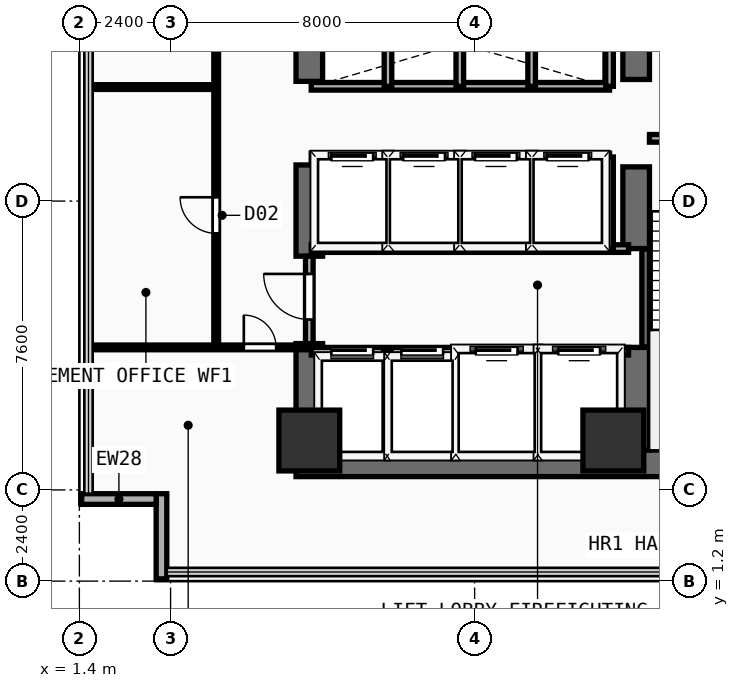
"""IFC4 building model, lengths in metres.
Left out: names, types, materials, properties, quantities, classifications, styles, units other than length and angle.
Written with IfcOpenShell. Run it as: python <this file> out.ifc"""

import sys

from ifc_helpers import new_model, si_unit, direction, frame, frame_2d, origin, origin_2d, place, context, subcontext, project, spatial, rectangle, extrude, element, fill, save


model = new_model("IFC4")
c1 = context("Model", 3, precision=1e-05, world=origin(), true_north=direction((0.0, 1.0)))
c2 = subcontext(c1, "Body", "Model", "MODEL_VIEW")
j1 = project(units=[si_unit("LENGTHUNIT", "METRE"), si_unit("PLANEANGLEUNIT", "RADIAN")], contexts=[c1])
p1 = place(None, origin())
s1 = spatial("IfcSite", under=j1, at=p1, CompositionType="ELEMENT")
p2 = place(p1, origin())
s2 = spatial("IfcBuilding", under=s1, at=p2, CompositionType="ELEMENT")
p3 = place(p2, frame((0.0, 0.0, 63.8)))
s3 = spatial("IfcBuildingStorey", under=s2, at=p3, CompositionType="ELEMENT", Elevation=63.8)
p4 = place(p3, frame((7.1, 4.3, 0.0), z_axis=(0.0, 0.0, 1.0), x_axis=(1.0, 0.0, 0.0)))
e1 = element("IfcWall", 1, at=p4, inside=s3, PredefinedType="SHEAR", context=c2, shape_type="SweptSolid", body=[
    extrude(rectangle(XDim=14.05, YDim=0.7, at=frame_2d((7.025, 0.0))), origin(), (0.0, 0.0, 1.0), 3.54),
])
p5 = place(p3, frame((7.45, 4.65, 0.0), z_axis=(0.0, 0.0, 1.0), x_axis=(0.0, 1.0, 0.0)))
e2 = element("IfcWall", 2, at=p5, inside=s3, PredefinedType="SHEAR", context=c2, shape_type="SweptSolid", body=[
    extrude(rectangle(XDim=2.8, YDim=0.7, at=frame_2d((1.4, 0.0))), origin(), (0.0, 0.0, 1.0), 3.54),
])
p6 = place(p3, frame((7.45, 9.75, 0.0), z_axis=(0.0, 0.0, 1.0), x_axis=(0.0, 1.0, 0.0)))
e3 = element("IfcWall", 3, at=p6, inside=s3, PredefinedType="SHEAR", context=c2, shape_type="SweptSolid", body=[
    extrude(rectangle(XDim=2.4, YDim=0.7, at=frame_2d((1.2, 0.0))), origin(), (0.0, 0.0, 1.0), 3.54),
])
p7 = place(p3, frame((7.45, 14.35, 0.0), z_axis=(0.0, 0.0, 1.0), x_axis=(0.0, 1.0, 0.0)))
e4 = element("IfcWall", 4, at=p7, inside=s3, PredefinedType="SHEAR", context=c2, shape_type="SweptSolid", body=[
    extrude(rectangle(XDim=4.81, YDim=0.7, at=frame_2d((2.405, 0.0))), origin(), (0.0, 0.0, 1.0), 3.54),
])
p8 = place(p3, frame((16.05, 4.65, 0.0), z_axis=(0.0, 0.0, 1.0), x_axis=(0.0, 1.0, 0.0)))
e5 = element("IfcWall", 5, at=p8, inside=s3, PredefinedType="SHEAR", context=c2, shape_type="SweptSolid", body=[
    extrude(rectangle(XDim=2.7, YDim=0.7, at=frame_2d((1.35, 0.0))), origin(), (0.0, 0.0, 1.0), 3.54),
])
p9 = place(p3, frame((16.05, 9.95, 0.0), z_axis=(0.0, 0.0, 1.0), x_axis=(0.0, 1.0, 0.0)))
e6 = element("IfcWall", 6, at=p9, inside=s3, PredefinedType="SHEAR", context=c2, shape_type="SweptSolid", body=[
    extrude(rectangle(XDim=2.15, YDim=0.7, at=frame_2d((1.075, 0.0))), origin(), (0.0, 0.0, 1.0), 3.54),
])
p10 = place(p3, frame((16.05, 14.4, 0.0), z_axis=(0.0, 0.0, 1.0), x_axis=(0.0, 1.0, 0.0)))
e7 = element("IfcWall", 7, at=p10, inside=s3, PredefinedType="SHEAR", context=c2, shape_type="SweptSolid", body=[
    extrude(rectangle(XDim=9.1, YDim=0.7, at=frame_2d((4.55, 0.0))), origin(), (0.0, 0.0, 1.0), 3.54),
])
for number, where, z_axis, x_axis in (
    (8, (7.45, 4.9, 0.0), (0.0, 0.0, 1.0), (1.0, 0.0, 0.0)),
    (9, (15.45, 4.9, 0.0), (0.0, 0.0, 1.0), (1.0, 0.0, 0.0)),
):
    element("IfcColumn", number, at=place(p3, frame(where, z_axis=z_axis, x_axis=x_axis)), inside=s3, PredefinedType="COLUMN", context=c2, shape_type="SweptSolid", body=[
        extrude(rectangle(XDim=1.6, YDim=1.6, at=origin_2d()), origin(), (0.0, 0.0, 1.0), 3.54),
    ])
p11 = place(p3, frame((3.56, 1.26, 0.0), z_axis=(0.0, 0.0, 1.0), x_axis=(0.0, 1.0, 0.0)))
e10 = element("IfcWall", 10, at=p11, inside=s3, PredefinedType="SOLIDWALL", context=c2, shape_type="SweptSolid", body=[
    extrude(rectangle(XDim=2.24, YDim=0.28, at=frame_2d((1.12, 0.0))), origin(), (0.0, 0.0, 1.0), 3.54),
])
p12 = place(p3, frame((1.46, 3.36, 0.0), z_axis=(0.0, 0.0, 1.0), x_axis=(1.0, 0.0, 0.0)))
e11 = element("IfcWall", 11, at=p12, inside=s3, PredefinedType="SOLIDWALL", context=c2, shape_type="SweptSolid", body=[
    extrude(rectangle(XDim=1.96, YDim=0.28, at=frame_2d((0.98, 0.0))), origin(), (0.0, 0.0, 1.0), 3.54),
])
p13 = place(p3, frame((16.3, 7.36, 0.0), z_axis=(0.0, 0.0, 1.0), x_axis=(0.0, 1.0, 0.0)))
e12 = element("IfcWall", 12, at=p13, inside=s3, PredefinedType="SHEAR", context=c2, shape_type="SweptSolid", body=[
    extrude(rectangle(XDim=2.58, YDim=0.2, at=frame_2d((1.29, 0.0))), origin(), (0.0, 0.0, 1.0), 3.54),
])
p14 = place(p3, frame((16.4, 12.85, 0.0), z_axis=(0.0, 0.0, 1.0), x_axis=(1.0, 0.0, 0.0)))
e13 = element("IfcWall", 13, at=p14, inside=s3, PredefinedType="PARTITIONING", context=c2, shape_type="SweptSolid", body=[
    extrude(rectangle(XDim=3.96, YDim=0.2, at=frame_2d((1.98, 0.0))), origin(), (0.0, 0.0, 1.0), 3.54),
])
p15 = place(p14, frame((1.304, 0.0, 0.0)))
e14 = element("IfcOpeningElement", 14, at=p15, cuts=e13, PredefinedType="OPENING", context=c2, shape_type="SweptSolid", body=[
    extrude(rectangle(XDim=1.1, YDim=2.2, at=frame_2d((0.55, 1.1))), frame((0.0, 0.11, 0.0), z_axis=(0.0, -1.0, 0.0), x_axis=(1.0, 0.0, 0.0)), (0.0, 0.0, 1.0), 0.22),
])
p16 = place(p3, frame((7.5, 7.25, 0.0), z_axis=(0.0, 0.0, 1.0), x_axis=(1.0, 0.0, 0.0)))
e15 = element("IfcWall", 15, at=p16, inside=s3, PredefinedType="PARTITIONING", context=c2, shape_type="SweptSolid", body=[
    extrude(rectangle(XDim=8.35, YDim=0.2, at=frame_2d((4.175, 0.0))), origin(), (0.0, 0.0, 1.0), 3.54),
])
p17 = place(p16, frame((0.53, 0.0, 0.0)))
e16 = element("IfcOpeningElement", 16, at=p17, cuts=e15, PredefinedType="OPENING", context=c2, shape_type="SweptSolid", body=[
    extrude(rectangle(XDim=1.1, YDim=2.2, at=frame_2d((0.55, 1.1))), frame((0.0, 0.11, 0.0), z_axis=(0.0, -1.0, 0.0), x_axis=(1.0, 0.0, 0.0)), (0.0, 0.0, 1.0), 0.22),
])
p18 = place(p16, frame((2.37, 0.0, 0.0)))
e17 = element("IfcOpeningElement", 17, at=p18, cuts=e15, PredefinedType="OPENING", context=c2, shape_type="SweptSolid", body=[
    extrude(rectangle(XDim=1.1, YDim=2.2, at=frame_2d((0.55, 1.1))), frame((0.0, 0.11, 0.0), z_axis=(0.0, -1.0, 0.0), x_axis=(1.0, 0.0, 0.0)), (0.0, 0.0, 1.0), 0.22),
])
p19 = place(p16, frame((4.33, 0.0, 0.0)))
e18 = element("IfcOpeningElement", 18, at=p19, cuts=e15, PredefinedType="OPENING", context=c2, shape_type="SweptSolid", body=[
    extrude(rectangle(XDim=1.1, YDim=2.2, at=frame_2d((0.55, 1.1))), frame((0.0, 0.11, 0.0), z_axis=(0.0, -1.0, 0.0), x_axis=(1.0, 0.0, 0.0)), (0.0, 0.0, 1.0), 0.22),
])
p20 = place(p16, frame((6.5, 0.0, 0.0)))
e19 = element("IfcOpeningElement", 19, at=p20, cuts=e15, PredefinedType="OPENING", context=c2, shape_type="SweptSolid", body=[
    extrude(rectangle(XDim=1.1, YDim=2.2, at=frame_2d((0.55, 1.1))), frame((0.0, 0.11, 0.0), z_axis=(0.0, -1.0, 0.0), x_axis=(1.0, 0.0, 0.0)), (0.0, 0.0, 1.0), 0.22),
])
p21 = place(p3, frame((7.5, 9.95, 0.0), z_axis=(0.0, 0.0, 1.0), x_axis=(1.0, 0.0, 0.0)))
e20 = element("IfcWall", 20, at=p21, inside=s3, PredefinedType="PARTITIONING", context=c2, shape_type="SweptSolid", body=[
    extrude(rectangle(XDim=8.35, YDim=0.2, at=frame_2d((4.175, 0.0))), origin(), (0.0, 0.0, 1.0), 3.54),
])
for number, where, z_axis, x_axis in (
    (21, (9.5, 4.45, 0.0), (0.0, 0.0, 1.0), (0.0, 1.0, 0.0)),
    (22, (11.36, 4.45, 0.0), (0.0, 0.0, 1.0), (0.0, 1.0, 0.0)),
    (23, (13.46, 4.45, 0.0), (0.0, 0.0, 1.0), (0.0, 1.0, 0.0)),
):
    element("IfcWall", number, at=place(p3, frame(where, z_axis=z_axis, x_axis=x_axis)), inside=s3, PredefinedType="PARTITIONING", context=c2, shape_type="SweptSolid", body=[
        extrude(rectangle(XDim=2.8, YDim=0.2, at=frame_2d((1.4, 0.0))), origin(), (0.0, 0.0, 1.0), 3.54),
    ])
p22 = place(p3, frame((7.45, 7.45, 0.0), z_axis=(0.0, 0.0, 1.0), x_axis=(0.0, 1.0, 0.0)))
e24 = element("IfcWall", 24, at=p22, inside=s3, PredefinedType="PARTITIONING", context=c2, shape_type="SweptSolid", body=[
    extrude(rectangle(XDim=2.3, YDim=0.2, at=frame_2d((1.15, 0.0))), origin(), (0.0, 0.0, 1.0), 2.52),
])
p23 = place(p22, frame((0.633, 0.0, 0.0)))
e25 = element("IfcOpeningElement", 25, at=p23, cuts=e24, PredefinedType="OPENING", context=c2, shape_type="SweptSolid", body=[
    extrude(rectangle(XDim=1.2, YDim=2.25, at=frame_2d((0.6, 1.125))), frame((0.0, 0.11, 0.0), z_axis=(0.0, -1.0, 0.0), x_axis=(1.0, 0.0, 0.0)), (0.0, 0.0, 1.0), 0.22),
])
p24 = place(p3, frame((7.5, 12.36, 0.0), z_axis=(0.0, 0.0, 1.0), x_axis=(1.0, 0.0, 0.0)))
e26 = element("IfcWall", 26, at=p24, inside=s3, PredefinedType="PARTITIONING", context=c2, shape_type="SweptSolid", body=[
    extrude(rectangle(XDim=7.85, YDim=0.2, at=frame_2d((3.925, 0.0))), origin(), (0.0, 0.0, 1.0), 3.54),
])
p25 = place(p24, frame((0.53, 0.0, 0.0)))
e27 = element("IfcOpeningElement", 27, at=p25, cuts=e26, PredefinedType="OPENING", context=c2, shape_type="SweptSolid", body=[
    extrude(rectangle(XDim=1.1, YDim=2.2, at=frame_2d((0.55, 1.1))), frame((0.0, 0.11, 0.0), z_axis=(0.0, -1.0, 0.0), x_axis=(1.0, 0.0, 0.0)), (0.0, 0.0, 1.0), 0.22),
])
p26 = place(p24, frame((2.42, 0.0, 0.0)))
e28 = element("IfcOpeningElement", 28, at=p26, cuts=e26, PredefinedType="OPENING", context=c2, shape_type="SweptSolid", body=[
    extrude(rectangle(XDim=1.1, YDim=2.2, at=frame_2d((0.55, 1.1))), frame((0.0, 0.11, 0.0), z_axis=(0.0, -1.0, 0.0), x_axis=(1.0, 0.0, 0.0)), (0.0, 0.0, 1.0), 0.22),
])
p27 = place(p24, frame((4.31, 0.0, 0.0)))
e29 = element("IfcOpeningElement", 29, at=p27, cuts=e26, PredefinedType="OPENING", context=c2, shape_type="SweptSolid", body=[
    extrude(rectangle(XDim=1.1, YDim=2.2, at=frame_2d((0.55, 1.1))), frame((0.0, 0.11, 0.0), z_axis=(0.0, -1.0, 0.0), x_axis=(1.0, 0.0, 0.0)), (0.0, 0.0, 1.0), 0.22),
])
p28 = place(p24, frame((6.2, 0.0, 0.0)))
e30 = element("IfcOpeningElement", 30, at=p28, cuts=e26, PredefinedType="OPENING", context=c2, shape_type="SweptSolid", body=[
    extrude(rectangle(XDim=1.1, YDim=2.2, at=frame_2d((0.55, 1.1))), frame((0.0, 0.11, 0.0), z_axis=(0.0, -1.0, 0.0), x_axis=(1.0, 0.0, 0.0)), (0.0, 0.0, 1.0), 0.22),
])
for number, where, z_axis, x_axis in (
    (31, (15.35, 9.95, 0.0), (0.0, 0.0, 1.0), (0.0, 1.0, 0.0)),
    (32, (9.52, 9.95, 0.0), (0.0, 0.0, 1.0), (0.0, 1.0, 0.0)),
    (33, (11.41, 9.95, 0.0), (0.0, 0.0, 1.0), (0.0, 1.0, 0.0)),
    (34, (13.3, 9.95, 0.0), (0.0, 0.0, 1.0), (0.0, 1.0, 0.0)),
):
    element("IfcWall", number, at=place(p3, frame(where, z_axis=z_axis, x_axis=x_axis)), inside=s3, PredefinedType="PARTITIONING", context=c2, shape_type="SweptSolid", body=[
        extrude(rectangle(XDim=2.41, YDim=0.2, at=frame_2d((1.205, 0.0))), origin(), (0.0, 0.0, 1.0), 3.54),
    ])
p29 = place(p3, frame((7.5, 14.22, 0.0), z_axis=(0.0, 0.0, 1.0), x_axis=(1.0, 0.0, 0.0)))
e35 = element("IfcWall", 35, at=p29, inside=s3, PredefinedType="PARTITIONING", context=c2, shape_type="SweptSolid", body=[
    extrude(rectangle(XDim=7.85, YDim=0.2, at=frame_2d((3.925, 0.0))), origin(), (0.0, 0.0, 1.0), 3.54),
])
for number, where, z_axis, x_axis in (
    (36, (15.35, 14.22, 0.0), (0.0, 0.0, 1.0), (0.0, 1.0, 0.0)),
    (37, (9.52, 14.22, 0.0), (0.0, 0.0, 1.0), (0.0, 1.0, 0.0)),
    (38, (11.41, 14.22, 0.0), (0.0, 0.0, 1.0), (0.0, 1.0, 0.0)),
    (39, (13.3, 14.22, 0.0), (0.0, 0.0, 1.0), (0.0, 1.0, 0.0)),
):
    element("IfcWall", number, at=place(p3, frame(where, z_axis=z_axis, x_axis=x_axis)), inside=s3, PredefinedType="PARTITIONING", context=c2, shape_type="SweptSolid", body=[
        extrude(rectangle(XDim=2.23, YDim=0.2, at=frame_2d((1.115, 0.0))), origin(), (0.0, 0.0, 1.0), 3.54),
    ])
p30 = place(p3, frame((1.64, 7.35, 0.0), z_axis=(0.0, 0.0, 1.0), x_axis=(1.0, 0.0, 0.0)))
e40 = element("IfcWall", 40, at=p30, inside=s3, PredefinedType="PARTITIONING", context=c2, shape_type="SweptSolid", body=[
    extrude(rectangle(XDim=5.76, YDim=0.125, at=frame_2d((2.88, 0.0))), origin(), (0.0, 0.0, 1.0), 3.54),
])
p31 = place(p30, frame((4.087, 0.0, 0.0)))
e41 = element("IfcOpeningElement", 41, at=p31, cuts=e40, PredefinedType="OPENING", context=c2, shape_type="SweptSolid", body=[
    extrude(rectangle(XDim=0.85, YDim=2.15, at=frame_2d((0.425, 1.075))), frame((0.0, 0.073, 0.0), z_axis=(0.0, -1.0, 0.0), x_axis=(1.0, 0.0, 0.0)), (0.0, 0.0, 1.0), 0.145),
])
p32 = place(p3, frame((5.0, 7.5, 0.0), z_axis=(0.0, 0.0, 1.0), x_axis=(0.0, 1.0, 0.0)))
e42 = element("IfcWall", 42, at=p32, inside=s3, PredefinedType="PARTITIONING", context=c2, shape_type="SweptSolid", body=[
    extrude(rectangle(XDim=17.75, YDim=0.125, at=frame_2d((8.875, 0.0))), origin(), (0.0, 0.0, 1.0), 3.54),
])
p33 = place(p32, frame((2.85, 0.0, 0.0)))
e43 = element("IfcOpeningElement", 43, at=p33, cuts=e42, PredefinedType="OPENING", context=c2, shape_type="SweptSolid", body=[
    extrude(rectangle(XDim=0.95, YDim=2.15, at=frame_2d((0.475, 1.075))), frame((0.0, 0.073, 0.0), z_axis=(0.0, -1.0, 0.0), x_axis=(1.0, 0.0, 0.0)), (0.0, 0.0, 1.0), 0.145),
])
p34 = place(p32, frame((11.821, 0.0, 0.0)))
e44 = element("IfcOpeningElement", 44, at=p34, cuts=e42, PredefinedType="OPENING", context=c2, shape_type="SweptSolid", body=[
    extrude(rectangle(XDim=0.95, YDim=2.15, at=frame_2d((0.475, 1.075))), frame((0.0, 0.073, 0.0), z_axis=(0.0, -1.0, 0.0), x_axis=(1.0, 0.0, 0.0)), (0.0, 0.0, 1.0), 0.145),
])
p35 = place(p3, frame((1.64, 14.2, 0.0), z_axis=(0.0, 0.0, 1.0), x_axis=(1.0, 0.0, 0.0)))
e45 = element("IfcWall", 45, at=p35, inside=s3, PredefinedType="PARTITIONING", context=c2, shape_type="SweptSolid", body=[
    extrude(rectangle(XDim=3.36, YDim=0.125, at=frame_2d((1.68, 0.0))), origin(), (0.0, 0.0, 1.0), 3.54),
])
p36 = place(p17, origin())
e46 = element("IfcDoor", 46, at=p36, inside=s3, OperationType="SLIDING_TO_LEFT", PredefinedType="DOOR", context=c2, shape_type="SweptSolid", body=[
    extrude(rectangle(XDim=1.1, YDim=2.2, at=frame_2d((0.55, 1.1))), frame((0.0, 0.025, 0.0), z_axis=(0.0, -1.0, 0.0), x_axis=(1.0, 0.0, 0.0)), (0.0, 0.0, 1.0), 0.05),
])
fill(e16, e46)
p37 = place(p18, origin())
e47 = element("IfcDoor", 47, at=p37, inside=s3, OperationType="SLIDING_TO_LEFT", PredefinedType="DOOR", context=c2, shape_type="SweptSolid", body=[
    extrude(rectangle(XDim=1.1, YDim=2.2, at=frame_2d((0.55, 1.1))), frame((0.0, 0.025, 0.0), z_axis=(0.0, -1.0, 0.0), x_axis=(1.0, 0.0, 0.0)), (0.0, 0.0, 1.0), 0.05),
])
fill(e17, e47)
p38 = place(p19, origin())
e48 = element("IfcDoor", 48, at=p38, inside=s3, OperationType="SLIDING_TO_LEFT", PredefinedType="DOOR", context=c2, shape_type="SweptSolid", body=[
    extrude(rectangle(XDim=1.1, YDim=2.2, at=frame_2d((0.55, 1.1))), frame((0.0, 0.025, 0.0), z_axis=(0.0, -1.0, 0.0), x_axis=(1.0, 0.0, 0.0)), (0.0, 0.0, 1.0), 0.05),
])
fill(e18, e48)
p39 = place(p20, origin())
e49 = element("IfcDoor", 49, at=p39, inside=s3, OperationType="SLIDING_TO_LEFT", PredefinedType="DOOR", context=c2, shape_type="SweptSolid", body=[
    extrude(rectangle(XDim=1.1, YDim=2.2, at=frame_2d((0.55, 1.1))), frame((0.0, 0.025, 0.0), z_axis=(0.0, -1.0, 0.0), x_axis=(1.0, 0.0, 0.0)), (0.0, 0.0, 1.0), 0.05),
])
fill(e19, e49)
p40 = place(p23, frame((1.2, 0.0, 0.0), z_axis=(0.0, 0.0, 1.0), x_axis=(-1.0, 0.0, 0.0)))
e50 = element("IfcDoor", 50, at=p40, inside=s3, OperationType="SINGLE_SWING_LEFT", PredefinedType="DOOR", context=c2, shape_type="SweptSolid", body=[
    extrude(rectangle(XDim=1.2, YDim=2.25, at=frame_2d((0.6, 1.125))), frame((0.0, 0.025, 0.0), z_axis=(0.0, -1.0, 0.0), x_axis=(1.0, 0.0, 0.0)), (0.0, 0.0, 1.0), 0.05),
])
fill(e25, e50)
p41 = place(p25, origin())
e51 = element("IfcDoor", 51, at=p41, inside=s3, OperationType="SLIDING_TO_LEFT", PredefinedType="DOOR", context=c2, shape_type="SweptSolid", body=[
    extrude(rectangle(XDim=1.1, YDim=2.2, at=frame_2d((0.55, 1.1))), frame((0.0, 0.025, 0.0), z_axis=(0.0, -1.0, 0.0), x_axis=(1.0, 0.0, 0.0)), (0.0, 0.0, 1.0), 0.05),
])
fill(e27, e51)
p42 = place(p26, origin())
e52 = element("IfcDoor", 52, at=p42, inside=s3, OperationType="SLIDING_TO_LEFT", PredefinedType="DOOR", context=c2, shape_type="SweptSolid", body=[
    extrude(rectangle(XDim=1.1, YDim=2.2, at=frame_2d((0.55, 1.1))), frame((0.0, 0.025, 0.0), z_axis=(0.0, -1.0, 0.0), x_axis=(1.0, 0.0, 0.0)), (0.0, 0.0, 1.0), 0.05),
])
fill(e28, e52)
p43 = place(p27, origin())
e53 = element("IfcDoor", 53, at=p43, inside=s3, OperationType="SLIDING_TO_LEFT", PredefinedType="DOOR", context=c2, shape_type="SweptSolid", body=[
    extrude(rectangle(XDim=1.1, YDim=2.2, at=frame_2d((0.55, 1.1))), frame((0.0, 0.025, 0.0), z_axis=(0.0, -1.0, 0.0), x_axis=(1.0, 0.0, 0.0)), (0.0, 0.0, 1.0), 0.05),
])
fill(e29, e53)
p44 = place(p28, origin())
e54 = element("IfcDoor", 54, at=p44, inside=s3, OperationType="SLIDING_TO_LEFT", PredefinedType="DOOR", context=c2, shape_type="SweptSolid", body=[
    extrude(rectangle(XDim=1.1, YDim=2.2, at=frame_2d((0.55, 1.1))), frame((0.0, 0.025, 0.0), z_axis=(0.0, -1.0, 0.0), x_axis=(1.0, 0.0, 0.0)), (0.0, 0.0, 1.0), 0.05),
])
fill(e30, e54)
p45 = place(p31, origin())
e55 = element("IfcDoor", 55, at=p45, inside=s3, OperationType="SINGLE_SWING_LEFT", PredefinedType="DOOR", context=c2, shape_type="SweptSolid", body=[
    extrude(rectangle(XDim=0.85, YDim=2.15, at=frame_2d((0.425, 1.075))), frame((0.0, 0.025, 0.0), z_axis=(0.0, -1.0, 0.0), x_axis=(1.0, 0.0, 0.0)), (0.0, 0.0, 1.0), 0.05),
])
fill(e41, e55)
p46 = place(p33, origin())
e56 = element("IfcDoor", 56, at=p46, inside=s3, OperationType="SINGLE_SWING_RIGHT", PredefinedType="DOOR", context=c2, shape_type="SweptSolid", body=[
    extrude(rectangle(XDim=0.95, YDim=2.15, at=frame_2d((0.475, 1.075))), frame((0.0, 0.025, 0.0), z_axis=(0.0, -1.0, 0.0), x_axis=(1.0, 0.0, 0.0)), (0.0, 0.0, 1.0), 0.05),
])
fill(e43, e56)
save(model, sys.argv[1])
